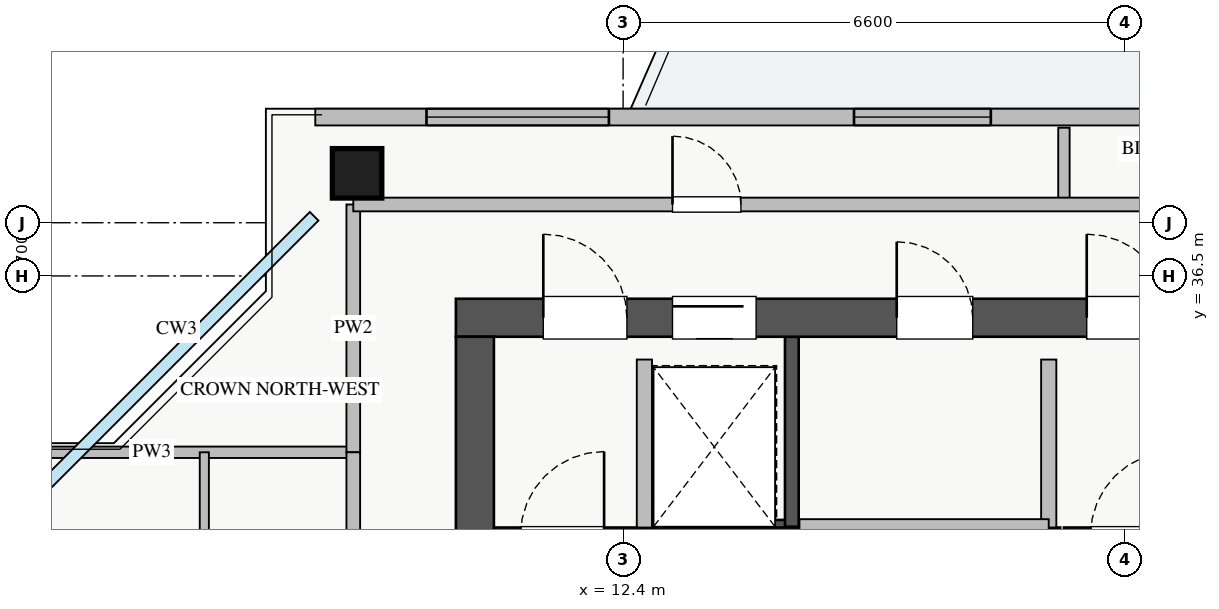
"""IFC4 building model, lengths in metres.
Left out: names, types, materials, properties, quantities, classifications, styles, units other than length and angle.
Written with IfcOpenShell. Run it as: python <this file> out.ifc"""

import sys

from ifc_helpers import new_model, si_unit, direction, frame, frame_2d, origin, origin_2d, place, context, subcontext, project, spatial, rectangle, extrude, source, transform, mapped, element, fill, save


model = new_model("IFC4")
c1 = context("Model", 3, precision=1e-05, world=origin(), true_north=direction((0.0, 1.0)))
c2 = subcontext(c1, "Body", "Model", "MODEL_VIEW")
j1 = project(units=[si_unit("LENGTHUNIT", "METRE"), si_unit("PLANEANGLEUNIT", "RADIAN")], contexts=[c1])
p1 = place(None, origin())
s1 = spatial("IfcSite", under=j1, at=p1, CompositionType="ELEMENT")
p2 = place(p1, origin())
s2 = spatial("IfcBuilding", under=s1, at=p2, CompositionType="ELEMENT")
p3 = place(p2, frame((0.0, 0.0, 253.5)))
s3 = spatial("IfcBuildingStorey", under=s2, at=p3, CompositionType="ELEMENT", Elevation=253.5)
p4 = place(p3, frame((12.68, 33.2, 0.0), z_axis=(0.0, 0.0, 1.0), x_axis=(1.0, 0.0, 0.0)))
e1 = element("IfcWall", 1, at=p4, inside=s3, PredefinedType="SHEAR", context=c2, shape_type="SweptSolid", body=[
    extrude(rectangle(XDim=1.94, YDim=0.18, at=frame_2d((0.97, 0.0))), origin(), (0.0, 0.0, 1.0), 3.07),
])
p5 = place(p3, frame((14.62, 33.2, 0.0), z_axis=(0.0, 0.0, 1.0), x_axis=(0.0, 1.0, 0.0)))
e2 = element("IfcWall", 2, at=p5, inside=s3, PredefinedType="SHEAR", context=c2, shape_type="SweptSolid", body=[
    extrude(rectangle(XDim=2.5, YDim=0.18, at=frame_2d((1.25, 0.0))), origin(), (0.0, 0.0, 1.0), 3.07),
])
p6 = place(p3, frame((10.7, 33.09, 0.0), z_axis=(0.0, 0.0, 1.0), x_axis=(1.0, 0.0, 0.0)))
e3 = element("IfcWall", 3, at=p6, inside=s3, PredefinedType="SHEAR", context=c2, shape_type="SweptSolid", body=[
    extrude(rectangle(XDim=7.45, YDim=0.2, at=frame_2d((3.725, 0.0))), origin(), (0.0, 0.0, 1.0), 3.25),
])
p7 = place(p6, frame((0.35, 0.0, 0.0)))
e4 = element("IfcOpeningElement", 4, at=p7, cuts=e3, PredefinedType="OPENING", context=c2, shape_type="SweptSolid", body=[
    extrude(rectangle(XDim=1.1, YDim=2.05, at=frame_2d((0.55, 1.025))), frame((0.0, 0.11, 0.0), z_axis=(0.0, -1.0, 0.0), x_axis=(1.0, 0.0, 0.0)), (0.0, 0.0, 1.0), 0.22),
])
p8 = place(p3, frame((18.2, 33.09, 0.0), z_axis=(0.0, 0.0, 1.0), x_axis=(1.0, 0.0, 0.0)))
e5 = element("IfcWall", 5, at=p8, inside=s3, PredefinedType="SHEAR", context=c2, shape_type="SweptSolid", body=[
    extrude(rectangle(XDim=7.15, YDim=0.2, at=frame_2d((3.575, 0.0))), origin(), (0.0, 0.0, 1.0), 3.25),
])
p9 = place(p8, frame((0.35, 0.0, 0.0)))
e6 = element("IfcOpeningElement", 6, at=p9, cuts=e5, PredefinedType="OPENING", context=c2, shape_type="SweptSolid", body=[
    extrude(rectangle(XDim=1.1, YDim=2.05, at=frame_2d((0.55, 1.025))), frame((0.0, 0.11, 0.0), z_axis=(0.0, -1.0, 0.0), x_axis=(1.0, 0.0, 0.0)), (0.0, 0.0, 1.0), 0.22),
])
p10 = place(p3, frame((10.2, 35.95, 0.0), z_axis=(0.0, 0.0, 1.0), x_axis=(1.0, 0.0, 0.0)))
e7 = element("IfcWall", 7, at=p10, inside=s3, PredefinedType="SHEAR", context=c2, shape_type="SweptSolid", body=[
    extrude(rectangle(XDim=17.6, YDim=0.5, at=frame_2d((8.8, 0.0))), origin(), (0.0, 0.0, 1.0), 3.25),
])
p11 = place(p10, frame((1.15, 0.0, 0.0)))
e8 = element("IfcOpeningElement", 8, at=p11, cuts=e7, PredefinedType="OPENING", context=c2, shape_type="SweptSolid", body=[
    extrude(rectangle(XDim=1.1, YDim=2.05, at=frame_2d((0.55, 1.025))), frame((0.0, 0.26, 0.0), z_axis=(0.0, -1.0, 0.0), x_axis=(1.0, 0.0, 0.0)), (0.0, 0.0, 1.0), 0.52),
])
p12 = place(p10, frame((8.3, 0.0, 0.0)))
e9 = element("IfcOpeningElement", 9, at=p12, cuts=e7, PredefinedType="OPENING", context=c2, shape_type="SweptSolid", body=[
    extrude(rectangle(XDim=1.1, YDim=2.05, at=frame_2d((0.55, 1.025))), frame((0.0, 0.26, 0.0), z_axis=(0.0, -1.0, 0.0), x_axis=(1.0, 0.0, 0.0)), (0.0, 0.0, 1.0), 0.52),
])
p13 = place(p10, frame((2.85, 0.0, 0.0)))
e10 = element("IfcOpeningElement", 10, at=p13, cuts=e7, PredefinedType="OPENING", context=c2, shape_type="SweptSolid", body=[
    extrude(rectangle(XDim=1.1, YDim=2.05, at=frame_2d((0.55, 1.025))), frame((0.0, 0.26, 0.0), z_axis=(0.0, -1.0, 0.0), x_axis=(1.0, 0.0, 0.0)), (0.0, 0.0, 1.0), 0.52),
])
p14 = place(p10, frame((5.8, 0.0, 0.0)))
e11 = element("IfcOpeningElement", 11, at=p14, cuts=e7, PredefinedType="OPENING", context=c2, shape_type="SweptSolid", body=[
    extrude(rectangle(XDim=1.0, YDim=2.05, at=frame_2d((0.5, 1.025))), frame((0.0, 0.26, 0.0), z_axis=(0.0, -1.0, 0.0), x_axis=(1.0, 0.0, 0.0)), (0.0, 0.0, 1.0), 0.52),
])
p15 = place(p10, frame((14.74, 0.0, 0.0)))
e12 = element("IfcOpeningElement", 12, at=p15, cuts=e7, PredefinedType="OPENING", context=c2, shape_type="SweptSolid", body=[
    extrude(rectangle(XDim=1.0, YDim=2.05, at=frame_2d((0.5, 1.025))), frame((0.0, 0.26, 0.0), z_axis=(0.0, -1.0, 0.0), x_axis=(1.0, 0.0, 0.0)), (0.0, 0.0, 1.0), 0.52),
])
p16 = place(p10, frame((10.005, 0.0, 0.0)))
e13 = element("IfcOpeningElement", 13, at=p16, cuts=e7, PredefinedType="OPENING", context=c2, shape_type="SweptSolid", body=[
    extrude(rectangle(XDim=1.0, YDim=2.05, at=frame_2d((0.5, 1.025))), frame((0.0, 0.26, 0.0), z_axis=(0.0, -1.0, 0.0), x_axis=(1.0, 0.0, 0.0)), (0.0, 0.0, 1.0), 0.52),
])
p17 = place(p10, frame((11.55, 0.0, 0.0)))
e14 = element("IfcOpeningElement", 14, at=p17, cuts=e7, PredefinedType="OPENING", context=c2, shape_type="SweptSolid", body=[
    extrude(rectangle(XDim=1.0, YDim=2.05, at=frame_2d((0.5, 1.025))), frame((0.0, 0.26, 0.0), z_axis=(0.0, -1.0, 0.0), x_axis=(1.0, 0.0, 0.0)), (0.0, 0.0, 1.0), 0.52),
])
p18 = place(p10, frame((13.215, 0.0, 0.0)))
e15 = element("IfcOpeningElement", 15, at=p18, cuts=e7, PredefinedType="OPENING", context=c2, shape_type="SweptSolid", body=[
    extrude(rectangle(XDim=1.0, YDim=2.05, at=frame_2d((0.5, 1.025))), frame((0.0, 0.26, 0.0), z_axis=(0.0, -1.0, 0.0), x_axis=(1.0, 0.0, 0.0)), (0.0, 0.0, 1.0), 0.52),
])
p19 = place(p3, frame((10.45, 29.5, 0.0), z_axis=(0.0, 0.0, 1.0), x_axis=(0.0, 1.0, 0.0)))
e16 = element("IfcWall", 16, at=p19, inside=s3, PredefinedType="SHEAR", context=c2, shape_type="SweptSolid", body=[
    extrude(rectangle(XDim=6.2, YDim=0.5, at=frame_2d((3.1, 0.0))), origin(), (0.0, 0.0, 1.0), 3.25),
])
m1 = source(origin(), c2, "Body", "SweptSolid", [
    extrude(rectangle(XDim=0.65, YDim=0.65, at=origin_2d()), origin(), (0.0, 0.0, 1.0), 3.25),
])
p20 = place(p3, frame((8.9, 37.85, 0.0), z_axis=(0.0, 0.0, 1.0), x_axis=(1.0, 0.0, 0.0)))
e17 = element("IfcColumn", 17, at=p20, inside=s3, PredefinedType="COLUMN", context=c2, shape_type="MappedRepresentation", body=[
    mapped(m1, transform((0.0, 0.0, 0.0), x_axis=(1.0, 0.0, 0.0), y_axis=(0.0, 1.0, 0.0), z_axis=(0.0, 0.0, 1.0), scale=1.0)),
])
p21 = place(p3, frame((8.35, 38.59, 0.0), z_axis=(0.0, 0.0, 1.0), x_axis=(1.0, 0.0, 0.0)))
e18 = element("IfcWall", 18, at=p21, inside=s3, PredefinedType="STANDARD", context=c2, shape_type="SweptSolid", body=[
    extrude(rectangle(XDim=21.3, YDim=0.22, at=frame_2d((10.65, 0.0))), origin(), (0.0, 0.0, 1.0), 2.61),
])
p22 = place(p21, frame((11.5, 0.0, 0.0)))
e19 = element("IfcOpeningElement", 19, at=p22, cuts=e18, PredefinedType="OPENING", context=c2, shape_type="SweptSolid", body=[
    extrude(rectangle(XDim=1.2, YDim=2.1, at=frame_2d((0.6, 1.05))), frame((0.0, 0.12, 0.0), z_axis=(0.0, -1.0, 0.0), x_axis=(1.0, 0.0, 0.0)), (0.0, 0.0, 1.0), 0.24),
])
p23 = place(p21, frame((1.463, 0.0, 0.9)))
e20 = element("IfcOpeningElement", 20, at=p23, cuts=e18, PredefinedType="OPENING", context=c2, shape_type="SweptSolid", body=[
    extrude(rectangle(XDim=2.4, YDim=1.48, at=frame_2d((1.2, 0.74))), frame((0.0, 0.12, 0.0), z_axis=(0.0, -1.0, 0.0), x_axis=(1.0, 0.0, 0.0)), (0.0, 0.0, 1.0), 0.24),
])
p24 = place(p21, frame((7.088, 0.0, 0.9)))
e21 = element("IfcOpeningElement", 21, at=p24, cuts=e18, PredefinedType="OPENING", context=c2, shape_type="SweptSolid", body=[
    extrude(rectangle(XDim=1.8, YDim=1.45, at=frame_2d((0.9, 0.725))), frame((0.0, 0.12, 0.0), z_axis=(0.0, -1.0, 0.0), x_axis=(1.0, 0.0, 0.0)), (0.0, 0.0, 1.0), 0.24),
])
p25 = place(p21, frame((19.775, 0.0, 0.9)))
e22 = element("IfcOpeningElement", 22, at=p25, cuts=e18, PredefinedType="OPENING", context=c2, shape_type="SweptSolid", body=[
    extrude(rectangle(XDim=1.2, YDim=1.4, at=frame_2d((0.6, 0.7))), frame((0.0, 0.12, 0.0), z_axis=(0.0, -1.0, 0.0), x_axis=(1.0, 0.0, 0.0)), (0.0, 0.0, 1.0), 0.24),
])
p26 = place(p21, frame((14.86, 0.0, 0.9)))
e23 = element("IfcOpeningElement", 23, at=p26, cuts=e18, PredefinedType="OPENING", context=c2, shape_type="SweptSolid", body=[
    extrude(rectangle(XDim=2.4, YDim=1.5, at=frame_2d((1.2, 0.75))), frame((0.0, 0.12, 0.0), z_axis=(0.0, -1.0, 0.0), x_axis=(1.0, 0.0, 0.0)), (0.0, 0.0, 1.0), 0.24),
])
for number, where, z_axis, x_axis in (
    (24, (12.68, 33.19, 0.0), (0.0, 0.0, 1.0), (0.0, 1.0, 0.0)),
    (25, (18.0, 33.19, 0.0), (0.0, 0.0, 1.0), (0.0, 1.0, 0.0)),
):
    element("IfcWall", number, at=place(p3, frame(where, z_axis=z_axis, x_axis=x_axis)), inside=s3, PredefinedType="PARTITIONING", context=c2, shape_type="SweptSolid", body=[
        extrude(rectangle(XDim=2.21, YDim=0.2, at=frame_2d((1.105, 0.0))), origin(), (0.0, 0.0, 1.0), 3.07),
    ])
p27 = place(p3, frame((14.72, 33.2, 0.0), z_axis=(0.0, 0.0, 1.0), x_axis=(1.0, 0.0, 0.0)))
e26 = element("IfcWall", 26, at=p27, inside=s3, PredefinedType="PARTITIONING", context=c2, shape_type="SweptSolid", body=[
    extrude(rectangle(XDim=3.28, YDim=0.2, at=frame_2d((1.64, 0.0))), origin(), (0.0, 0.0, 1.0), 3.07),
])
p28 = place(p3, frame((3.55, 34.18, 0.0), z_axis=(0.0, 0.0, 1.0), x_axis=(1.0, 0.0, 0.0)))
e27 = element("IfcWall", 27, at=p28, inside=s3, PredefinedType="PARTITIONING", context=c2, shape_type="SweptSolid", body=[
    extrude(rectangle(XDim=5.3, YDim=0.15, at=frame_2d((2.65, 0.0))), origin(), (0.0, 0.0, 1.0), 3.07),
])
p29 = place(p3, frame((8.85, 34.18, 0.0), z_axis=(0.0, 0.0, 1.0), x_axis=(0.0, 1.0, 0.0)))
e28 = element("IfcWall", 28, at=p29, inside=s3, PredefinedType="PARTITIONING", context=c2, shape_type="SweptSolid", body=[
    extrude(rectangle(XDim=3.26, YDim=0.18, at=frame_2d((1.63, 0.0))), origin(), (0.0, 0.0, 1.0), 2.569),
])
p30 = place(p3, frame((18.2, 37.44, 0.0), z_axis=(0.0, 0.0, 1.0), x_axis=(0.0, 1.0, 0.0)))
e29 = element("IfcWall", 29, at=p30, inside=s3, PredefinedType="PARTITIONING", context=c2, shape_type="SweptSolid", body=[
    extrude(rectangle(XDim=1.01, YDim=0.15, at=frame_2d((0.505, 0.0))), origin(), (0.0, 0.0, 1.0), 3.07),
])
p31 = place(p3, frame((8.85, 37.44, 0.0), z_axis=(0.0, 0.0, 1.0), x_axis=(1.0, 0.0, 0.0)))
e30 = element("IfcWall", 30, at=p31, inside=s3, PredefinedType="PARTITIONING", context=c2, shape_type="SweptSolid", body=[
    extrude(rectangle(XDim=18.95, YDim=0.18, at=frame_2d((9.475, 0.0))), origin(), (0.0, 0.0, 1.0), 3.07),
])
p32 = place(p31, frame((4.2, 0.0, 0.0)))
e31 = element("IfcOpeningElement", 31, at=p32, cuts=e30, PredefinedType="OPENING", context=c2, shape_type="SweptSolid", body=[
    extrude(rectangle(XDim=0.9, YDim=2.05, at=frame_2d((0.45, 1.025))), frame((0.0, 0.1, 0.0), z_axis=(0.0, -1.0, 0.0), x_axis=(1.0, 0.0, 0.0)), (0.0, 0.0, 1.0), 0.2),
])
p33 = place(p31, frame((12.8, 0.0, 0.0)))
e32 = element("IfcOpeningElement", 32, at=p33, cuts=e30, PredefinedType="OPENING", context=c2, shape_type="SweptSolid", body=[
    extrude(rectangle(XDim=0.9, YDim=2.05, at=frame_2d((0.45, 1.025))), frame((0.0, 0.1, 0.0), z_axis=(0.0, -1.0, 0.0), x_axis=(1.0, 0.0, 0.0)), (0.0, 0.0, 1.0), 0.2),
])
p34 = place(p3, frame((6.89, 29.29, 0.0), z_axis=(0.0, 0.0, 1.0), x_axis=(0.0, 1.0, 0.0)))
e33 = element("IfcWall", 33, at=p34, inside=s3, PredefinedType="PLUMBINGWALL", context=c2, shape_type="SweptSolid", body=[
    extrude(rectangle(XDim=4.89, YDim=0.12, at=frame_2d((2.445, 0.0))), origin(), (0.0, 0.0, 1.0), 3.07),
])
p35 = place(p3, frame((8.85, 11.82, 0.0), z_axis=(0.0, 0.0, 1.0), x_axis=(0.0, 1.0, 0.0)))
e34 = element("IfcWall", 34, at=p35, inside=s3, PredefinedType="PARTITIONING", context=c2, shape_type="SweptSolid", body=[
    extrude(rectangle(XDim=22.36, YDim=0.18, at=frame_2d((11.18, 0.0))), origin(), (0.0, 0.0, 1.0), 2.569),
])
p36 = place(p35, frame((2.475, 0.0, 0.0)))
e35 = element("IfcOpeningElement", 35, at=p36, cuts=e34, PredefinedType="OPENING", context=c2, shape_type="SweptSolid", body=[
    extrude(rectangle(XDim=1.0, YDim=2.05, at=frame_2d((0.5, 1.025))), frame((0.0, 0.1, 0.0), z_axis=(0.0, -1.0, 0.0), x_axis=(1.0, 0.0, 0.0)), (0.0, 0.0, 1.0), 0.2),
])
p37 = place(p35, frame((13.91, 0.0, 0.0)))
e36 = element("IfcOpeningElement", 36, at=p37, cuts=e34, PredefinedType="OPENING", context=c2, shape_type="SweptSolid", body=[
    extrude(rectangle(XDim=1.0, YDim=2.05, at=frame_2d((0.5, 1.025))), frame((0.0, 0.1, 0.0), z_axis=(0.0, -1.0, 0.0), x_axis=(1.0, 0.0, 0.0)), (0.0, 0.0, 1.0), 0.2),
])
m2 = source(origin(), c2, "Body", "SweptSolid", [
    extrude(rectangle(XDim=2.4, YDim=1.48, at=frame_2d((1.2, 0.74))), frame((0.0, 0.03, 0.0), z_axis=(0.0, -1.0, 0.0), x_axis=(1.0, 0.0, 0.0)), (0.0, 0.0, 1.0), 0.06),
])
p38 = place(p23, origin())
e37 = element("IfcWindow", 37, at=p38, inside=s3, PartitioningType="TRIPLE_PANEL_VERTICAL", PredefinedType="WINDOW", context=c2, shape_type="MappedRepresentation", body=[
    mapped(m2, transform((0.0, 0.0, 0.0), x_axis=(1.0, 0.0, 0.0), y_axis=(0.0, 1.0, 0.0), z_axis=(0.0, 0.0, 1.0), scale=1.0)),
])
fill(e20, e37)
m3 = source(origin(), c2, "Body", "SweptSolid", [
    extrude(rectangle(XDim=1.8, YDim=1.45, at=frame_2d((0.9, 0.725))), frame((0.0, 0.03, 0.0), z_axis=(0.0, -1.0, 0.0), x_axis=(1.0, 0.0, 0.0)), (0.0, 0.0, 1.0), 0.06),
])
p39 = place(p24, origin())
e38 = element("IfcWindow", 38, at=p39, inside=s3, PartitioningType="DOUBLE_PANEL_VERTICAL", PredefinedType="WINDOW", context=c2, shape_type="MappedRepresentation", body=[
    mapped(m3, transform((0.0, 0.0, 0.0), x_axis=(1.0, 0.0, 0.0), y_axis=(0.0, 1.0, 0.0), z_axis=(0.0, 0.0, 1.0), scale=1.0)),
])
fill(e21, e38)
m4 = source(origin(), c2, "Body", "SweptSolid", [
    extrude(rectangle(XDim=1.1, YDim=2.05, at=frame_2d((0.55, 1.025))), frame((0.0, 0.025, 0.0), z_axis=(0.0, -1.0, 0.0), x_axis=(1.0, 0.0, 0.0)), (0.0, 0.0, 1.0), 0.05),
])
p40 = place(p11, origin())
e39 = element("IfcDoor", 39, at=p40, inside=s3, OperationType="SINGLE_SWING_LEFT", PredefinedType="DOOR", context=c2, shape_type="MappedRepresentation", body=[
    mapped(m4, transform((0.0, 0.0, 0.0), x_axis=(1.0, 0.0, 0.0), y_axis=(0.0, 1.0, 0.0), z_axis=(0.0, 0.0, 1.0), scale=1.0)),
])
fill(e8, e39)
p41 = place(p12, origin())
e40 = element("IfcDoor", 40, at=p41, inside=s3, OperationType="SINGLE_SWING_LEFT", PredefinedType="DOOR", context=c2, shape_type="MappedRepresentation", body=[
    mapped(m4, transform((0.0, 0.0, 0.0), x_axis=(1.0, 0.0, 0.0), y_axis=(0.0, 1.0, 0.0), z_axis=(0.0, 0.0, 1.0), scale=1.0)),
])
fill(e9, e40)
p42 = place(p13, origin())
e41 = element("IfcDoor", 41, at=p42, inside=s3, OperationType="SLIDING_TO_LEFT", PredefinedType="DOOR", context=c2, shape_type="MappedRepresentation", body=[
    mapped(m4, transform((0.0, 0.0, 0.0), x_axis=(1.0, 0.0, 0.0), y_axis=(0.0, 1.0, 0.0), z_axis=(0.0, 0.0, 1.0), scale=1.0)),
])
fill(e10, e41)
m5 = source(origin(), c2, "Body", "SweptSolid", [
    extrude(rectangle(XDim=1.0, YDim=2.05, at=frame_2d((0.5, 1.025))), frame((0.0, 0.025, 0.0), z_axis=(0.0, -1.0, 0.0), x_axis=(1.0, 0.0, 0.0)), (0.0, 0.0, 1.0), 0.05),
])
p43 = place(p14, origin())
e42 = element("IfcDoor", 42, at=p43, inside=s3, OperationType="SINGLE_SWING_LEFT", PredefinedType="DOOR", context=c2, shape_type="MappedRepresentation", body=[
    mapped(m5, transform((0.0, 0.0, 0.0), x_axis=(1.0, 0.0, 0.0), y_axis=(0.0, 1.0, 0.0), z_axis=(0.0, 0.0, 1.0), scale=1.0)),
])
fill(e11, e42)
m6 = source(origin(), c2, "Body", "SweptSolid", [
    extrude(rectangle(XDim=0.9, YDim=2.05, at=frame_2d((0.45, 1.025))), frame((0.0, 0.025, 0.0), z_axis=(0.0, -1.0, 0.0), x_axis=(1.0, 0.0, 0.0)), (0.0, 0.0, 1.0), 0.05),
])
p44 = place(p32, origin())
e43 = element("IfcDoor", 43, at=p44, inside=s3, OperationType="SINGLE_SWING_LEFT", PredefinedType="DOOR", context=c2, shape_type="MappedRepresentation", body=[
    mapped(m6, transform((0.0, 0.0, 0.0), x_axis=(1.0, 0.0, 0.0), y_axis=(0.0, 1.0, 0.0), z_axis=(0.0, 0.0, 1.0), scale=1.0)),
])
fill(e31, e43)
save(model, sys.argv[1])
